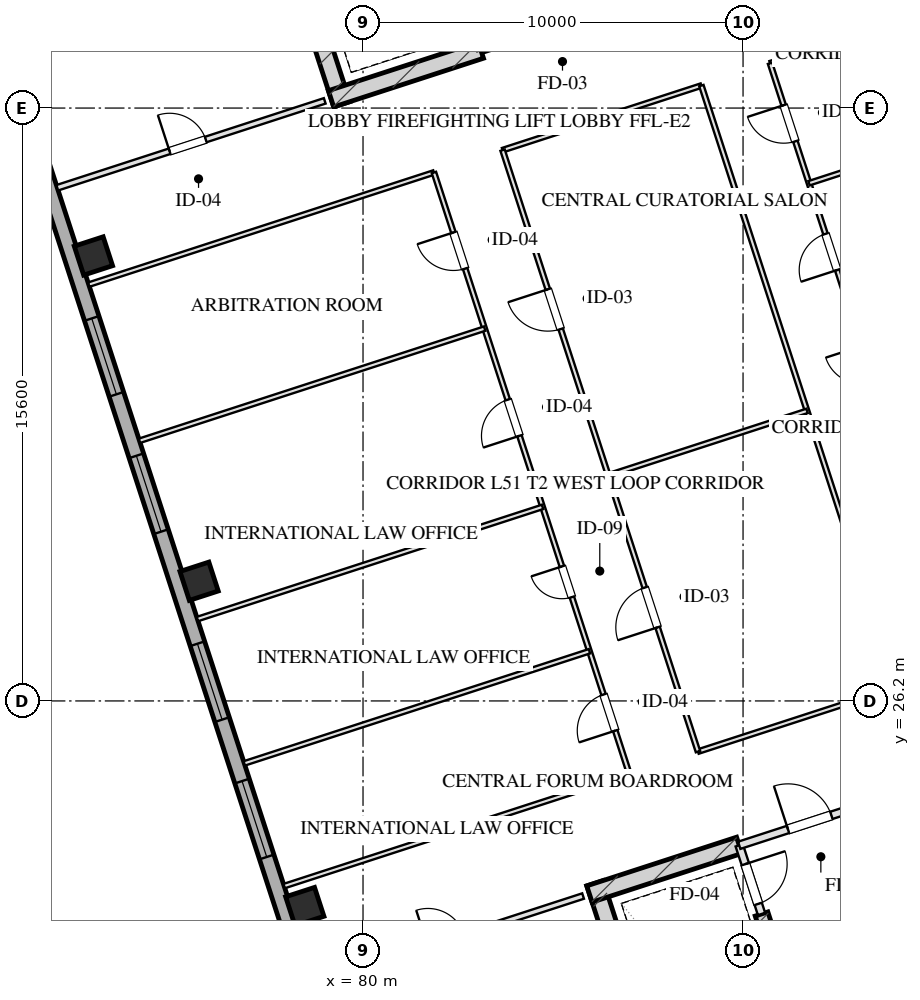
"""IFC4 building model, lengths in metres.
Left out: names, types, materials, properties, quantities, classifications, styles, units other than length and angle.
Written with IfcOpenShell. Run it as: python <this file> out.ifc"""

import sys

from ifc_helpers import new_model, si_unit, direction, frame, frame_2d, origin, origin_2d, place, context, subcontext, project, spatial, rectangle, hollow_rectangle, extrude, element, fill, save


model = new_model("IFC4")
c1 = context("Model", 3, precision=1e-05, world=origin(), true_north=direction((0.0, 1.0)))
c2 = subcontext(c1, "Body", "Model", "MODEL_VIEW")
j1 = project(units=[si_unit("LENGTHUNIT", "METRE"), si_unit("PLANEANGLEUNIT", "RADIAN")], contexts=[c1])
p1 = place(None, origin())
s1 = spatial("IfcSite", under=j1, at=p1, CompositionType="ELEMENT")
p2 = place(p1, origin())
s2 = spatial("IfcBuilding", under=s1, at=p2, CompositionType="ELEMENT")
p3 = place(p2, frame((0.0, 0.0, 192.05)))
s3 = spatial("IfcBuildingStorey", under=s2, at=p3, CompositionType="ELEMENT", Elevation=192.05)
p4 = place(p3, frame((86.102, 21.404, 0.0), z_axis=(0.0, 0.0, 1.0), x_axis=(0.309035778627, -0.951050412717, 0.0)))
e1 = element("IfcWall", 1, at=p4, inside=s3, PredefinedType="SHEAR", context=c2, shape_type="SweptSolid", body=[
    extrude(rectangle(XDim=9.33, YDim=0.45, at=frame_2d((4.665, 0.0))), origin(), (0.0, 0.0, 1.0), 3.45),
])
p5 = place(p3, frame((90.486, 20.594, 0.0), z_axis=(0.0, 0.0, 1.0), x_axis=(0.309020428229, -0.951055400562, 0.0)))
e2 = element("IfcWall", 2, at=p5, inside=s3, PredefinedType="SHEAR", context=c2, shape_type="SweptSolid", body=[
    extrude(rectangle(XDim=6.98, YDim=0.35, at=frame_2d((3.49, 0.0))), origin(), (0.0, 0.0, 1.0), 3.45),
])
p6 = place(p3, frame((85.957, 21.12, 0.0), z_axis=(0.0, 0.0, 1.0), x_axis=(0.951064796122, 0.308991510526, 0.0)))
e3 = element("IfcWall", 3, at=p6, inside=s3, PredefinedType="SHEAR", context=c2, shape_type="SweptSolid", body=[
    extrude(rectangle(XDim=4.145, YDim=0.45, at=frame_2d((2.073, 0.0))), origin(), (0.0, 0.0, 1.0), 3.45),
])
p7 = place(p3, frame((79.442, 41.899, 0.0), z_axis=(0.0, 0.0, 1.0), x_axis=(-0.309035778627, 0.951050412717, 0.0)))
e4 = element("IfcWall", 4, at=p7, inside=s3, PredefinedType="SHEAR", context=c2, shape_type="SweptSolid", body=[
    extrude(rectangle(XDim=9.33, YDim=0.45, at=frame_2d((4.665, 0.0))), origin(), (0.0, 0.0, 1.0), 3.45),
])
p8 = place(p3, frame((79.159, 42.043, 0.0), z_axis=(0.0, 0.0, 1.0), x_axis=(0.951047485828, 0.309044785913, 0.0)))
e5 = element("IfcWall", 5, at=p8, inside=s3, PredefinedType="SHEAR", context=c2, shape_type="SweptSolid", body=[
    extrude(rectangle(XDim=4.145, YDim=0.45, at=frame_2d((2.073, 0.0))), origin(), (0.0, 0.0, 1.0), 3.45),
])
for number, where, z_axis, x_axis in (
    (6, (78.468, 20.79, 0.0), (0.0, 0.0, 1.0), (0.951, 0.309, 0.0)),
    (7, (75.687, 29.349, 0.0), (0.0, 0.0, 1.0), (0.951, 0.309, 0.0)),
    (8, (72.906, 37.909, 0.0), (0.0, 0.0, 1.0), (0.951, 0.309, 0.0)),
):
    element("IfcColumn", number, at=place(p3, frame(where, z_axis=z_axis, x_axis=x_axis)), inside=s3, PredefinedType="COLUMN", context=c2, shape_type="SweptSolid", body=[
        extrude(hollow_rectangle(XDim=0.8, YDim=0.8, WallThickness=0.028, at=origin_2d()), origin(), (0.0, 0.0, 1.0), 3.451),
    ])
p9 = place(p3, frame((81.776, 8.827, 0.0), z_axis=(0.0, 0.0, 1.0), x_axis=(-0.309014228706, 0.951057414911, 0.0)))
e9 = element("IfcWall", 9, at=p9, inside=s3, PredefinedType="SOLIDWALL", context=c2, shape_type="SweptSolid", body=[
    extrude(rectangle(XDim=42.8, YDim=0.4, at=frame_2d((21.4, 0.0))), origin(), (0.0, 0.0, 1.0), 2.61),
])
p10 = place(p9, frame((13.95, 0.0, 0.75)))
e10 = element("IfcOpeningElement", 10, at=p10, cuts=e9, PredefinedType="OPENING", context=c2, shape_type="SweptSolid", body=[
    extrude(rectangle(XDim=2.1, YDim=1.46, at=frame_2d((1.05, 0.73))), frame((0.0, 0.21, 0.0), z_axis=(0.0, -1.0, 0.0), x_axis=(1.0, 0.0, 0.0)), (0.0, 0.0, 1.0), 0.42),
])
p11 = place(p9, frame((17.75, 0.0, 0.75)))
e11 = element("IfcOpeningElement", 11, at=p11, cuts=e9, PredefinedType="OPENING", context=c2, shape_type="SweptSolid", body=[
    extrude(rectangle(XDim=2.1, YDim=1.46, at=frame_2d((1.05, 0.73))), frame((0.0, 0.21, 0.0), z_axis=(0.0, -1.0, 0.0), x_axis=(1.0, 0.0, 0.0)), (0.0, 0.0, 1.0), 0.42),
])
p12 = place(p9, frame((22.95, 0.0, 0.75)))
e12 = element("IfcOpeningElement", 12, at=p12, cuts=e9, PredefinedType="OPENING", context=c2, shape_type="SweptSolid", body=[
    extrude(rectangle(XDim=2.1, YDim=1.46, at=frame_2d((1.05, 0.73))), frame((0.0, 0.21, 0.0), z_axis=(0.0, -1.0, 0.0), x_axis=(1.0, 0.0, 0.0)), (0.0, 0.0, 1.0), 0.42),
])
p13 = place(p9, frame((26.75, 0.0, 0.75)))
e13 = element("IfcOpeningElement", 13, at=p13, cuts=e9, PredefinedType="OPENING", context=c2, shape_type="SweptSolid", body=[
    extrude(rectangle(XDim=2.1, YDim=1.46, at=frame_2d((1.05, 0.73))), frame((0.0, 0.21, 0.0), z_axis=(0.0, -1.0, 0.0), x_axis=(1.0, 0.0, 0.0)), (0.0, 0.0, 1.0), 0.42),
])
p14 = place(p3, frame((89.899, 22.401, 0.0), z_axis=(0.0, 0.0, 1.0), x_axis=(0.308932062672, -0.951084108086, 0.0)))
e14 = element("IfcWall", 14, at=p14, inside=s3, PredefinedType="PARTITIONING", context=c2, shape_type="SweptSolid", body=[
    extrude(rectangle(XDim=1.9, YDim=0.2, at=frame_2d((0.95, 0.0))), origin(), (0.0, 0.0, 1.0), 3.175),
])
p15 = place(p14, frame((0.52, 0.0, 0.0)))
e15 = element("IfcOpeningElement", 15, at=p15, cuts=e14, PredefinedType="OPENING", context=c2, shape_type="SweptSolid", body=[
    extrude(rectangle(XDim=1.1, YDim=2.05, at=frame_2d((0.55, 1.025))), frame((0.0, 0.11, 0.0), z_axis=(0.0, -1.0, 0.0), x_axis=(1.0, 0.0, 0.0)), (0.0, 0.0, 1.0), 0.22),
])
p16 = place(p3, frame((89.899, 22.401, 0.0), z_axis=(0.0, 0.0, 1.0), x_axis=(0.951046716504, 0.309047153403, 0.0)))
e16 = element("IfcWall", 16, at=p16, inside=s3, PredefinedType="PARTITIONING", context=c2, shape_type="SweptSolid", body=[
    extrude(rectangle(XDim=3.83, YDim=0.2, at=frame_2d((1.915, 0.0))), origin(), (0.0, 0.0, 1.0), 3.175),
])
p17 = place(p16, frame((1.35, 0.0, 0.0)))
e17 = element("IfcOpeningElement", 17, at=p17, cuts=e16, PredefinedType="OPENING", context=c2, shape_type="SweptSolid", body=[
    extrude(rectangle(XDim=1.2, YDim=2.05, at=frame_2d((0.6, 1.025))), frame((0.0, 0.11, 0.0), z_axis=(0.0, -1.0, 0.0), x_axis=(1.0, 0.0, 0.0)), (0.0, 0.0, 1.0), 0.22),
])
p18 = place(p3, frame((83.101, 43.324, 0.0), z_axis=(0.0, 0.0, 1.0), x_axis=(0.951052804469, 0.309028417967, 0.0)))
e18 = element("IfcWall", 18, at=p18, inside=s3, PredefinedType="PARTITIONING", context=c2, shape_type="SweptSolid", body=[
    extrude(rectangle(XDim=3.83, YDim=0.2, at=frame_2d((1.915, 0.0))), origin(), (0.0, 0.0, 1.0), 3.175),
])
p19 = place(p18, frame((1.35, 0.0, 0.0)))
e19 = element("IfcOpeningElement", 19, at=p19, cuts=e18, PredefinedType="OPENING", context=c2, shape_type="SweptSolid", body=[
    extrude(rectangle(XDim=1.2, YDim=2.05, at=frame_2d((0.6, 1.025))), frame((0.0, 0.11, 0.0), z_axis=(0.0, -1.0, 0.0), x_axis=(1.0, 0.0, 0.0)), (0.0, 0.0, 1.0), 0.22),
])
p20 = place(p3, frame((78.753, 18.78, 0.0), z_axis=(0.0, 0.0, 1.0), x_axis=(0.951060977215, 0.309003264738, 0.0)))
e20 = element("IfcWall", 20, at=p20, inside=s3, PredefinedType="PARTITIONING", context=c2, shape_type="SweptSolid", body=[
    extrude(rectangle(XDim=7.4, YDim=0.15, at=frame_2d((3.7, 0.0))), origin(), (0.0, 0.0, 1.0), 3.175),
])
p21 = place(p20, frame((3.108, 0.0, 0.0)))
e21 = element("IfcOpeningElement", 21, at=p21, cuts=e20, PredefinedType="OPENING", context=c2, shape_type="SweptSolid", body=[
    extrude(rectangle(XDim=1.0, YDim=2.05, at=frame_2d((0.5, 1.025))), frame((0.0, 0.085, 0.0), z_axis=(0.0, -1.0, 0.0), x_axis=(1.0, 0.0, 0.0)), (0.0, 0.0, 1.0), 0.17),
])
p22 = place(p3, frame((71.955, 39.703, 0.0), z_axis=(0.0, 0.0, 1.0), x_axis=(0.951060977215, 0.309003264738, 0.0)))
e22 = element("IfcWall", 22, at=p22, inside=s3, PredefinedType="PARTITIONING", context=c2, shape_type="SweptSolid", body=[
    extrude(rectangle(XDim=7.4, YDim=0.15, at=frame_2d((3.7, 0.0))), origin(), (0.0, 0.0, 1.0), 3.175),
])
p23 = place(p22, frame((3.108, 0.0, 0.0)))
e23 = element("IfcOpeningElement", 23, at=p23, cuts=e22, PredefinedType="OPENING", context=c2, shape_type="SweptSolid", body=[
    extrude(rectangle(XDim=1.0, YDim=2.05, at=frame_2d((0.5, 1.025))), frame((0.0, 0.085, 0.0), z_axis=(0.0, -1.0, 0.0), x_axis=(1.0, 0.0, 0.0)), (0.0, 0.0, 1.0), 0.17),
])
p24 = place(p3, frame((77.925, 21.328, 0.0), z_axis=(0.0, 0.0, 1.0), x_axis=(0.951053980838, 0.309024797601, 0.0)))
e24 = element("IfcWall", 24, at=p24, inside=s3, PredefinedType="PARTITIONING", context=c2, shape_type="SweptSolid", body=[
    extrude(rectangle(XDim=9.55, YDim=0.12, at=frame_2d((4.775, 0.0))), origin(), (0.0, 0.0, 1.0), 3.175),
])
p25 = place(p3, frame((88.814, 24.867, 0.0), z_axis=(0.0, 0.0, 1.0), x_axis=(0.951061793147, 0.309000753423, 0.0)))
e25 = element("IfcWall", 25, at=p25, inside=s3, PredefinedType="PARTITIONING", context=c2, shape_type="SweptSolid", body=[
    extrude(rectangle(XDim=5.5, YDim=0.12, at=frame_2d((2.75, 0.0))), origin(), (0.0, 0.0, 1.0), 3.175),
])
p26 = place(p3, frame((72.783, 37.154, 0.0), z_axis=(0.0, 0.0, 1.0), x_axis=(0.951053980838, 0.309024797601, 0.0)))
e26 = element("IfcWall", 26, at=p26, inside=s3, PredefinedType="PARTITIONING", context=c2, shape_type="SweptSolid", body=[
    extrude(rectangle(XDim=9.55, YDim=0.12, at=frame_2d((4.775, 0.0))), origin(), (0.0, 0.0, 1.0), 3.175),
])
p27 = place(p3, frame((83.672, 40.692, 0.0), z_axis=(0.0, 0.0, 1.0), x_axis=(0.951048747115, 0.30904090443, 0.0)))
e27 = element("IfcWall", 27, at=p27, inside=s3, PredefinedType="PARTITIONING", context=c2, shape_type="SweptSolid", body=[
    extrude(rectangle(XDim=5.5, YDim=0.12, at=frame_2d((2.75, 0.0))), origin(), (0.0, 0.0, 1.0), 3.175),
])
p28 = place(p3, frame((90.71, 42.979, 0.0), z_axis=(0.0, 0.0, 1.0), x_axis=(0.95105853842, 0.309010770845, 0.0)))
e28 = element("IfcWall", 28, at=p28, inside=s3, PredefinedType="PARTITIONING", context=c2, shape_type="SweptSolid", body=[
    extrude(rectangle(XDim=11.95, YDim=0.12, at=frame_2d((5.975, 0.0))), origin(), (0.0, 0.0, 1.0), 3.175),
])
p29 = place(p3, frame((87.007, 24.28, 0.0), z_axis=(0.0, 0.0, 1.0), x_axis=(-0.309022042254, 0.951054876125, 0.0)))
e29 = element("IfcWall", 29, at=p29, inside=s3, PredefinedType="PARTITIONING", context=c2, shape_type="SweptSolid", body=[
    extrude(rectangle(XDim=16.64, YDim=0.12, at=frame_2d((8.32, 0.0))), origin(), (0.0, 0.0, 1.0), 3.175),
])
p30 = place(p29, frame((1.197, 0.0, 0.0)))
e30 = element("IfcOpeningElement", 30, at=p30, cuts=e29, PredefinedType="OPENING", context=c2, shape_type="SweptSolid", body=[
    extrude(rectangle(XDim=1.0, YDim=2.05, at=frame_2d((0.5, 1.025))), frame((0.0, 0.07, 0.0), z_axis=(0.0, -1.0, 0.0), x_axis=(1.0, 0.0, 0.0)), (0.0, 0.0, 1.0), 0.14),
])
p31 = place(p29, frame((4.891, 0.0, 0.0)))
e31 = element("IfcOpeningElement", 31, at=p31, cuts=e29, PredefinedType="OPENING", context=c2, shape_type="SweptSolid", body=[
    extrude(rectangle(XDim=0.85, YDim=2.05, at=frame_2d((0.425, 1.025))), frame((0.0, 0.07, 0.0), z_axis=(0.0, -1.0, 0.0), x_axis=(1.0, 0.0, 0.0)), (0.0, 0.0, 1.0), 0.14),
])
p32 = place(p29, frame((9.354, 0.0, 0.0)))
e32 = element("IfcOpeningElement", 32, at=p32, cuts=e29, PredefinedType="OPENING", context=c2, shape_type="SweptSolid", body=[
    extrude(rectangle(XDim=1.0, YDim=2.05, at=frame_2d((0.5, 1.025))), frame((0.0, 0.07, 0.0), z_axis=(0.0, -1.0, 0.0), x_axis=(1.0, 0.0, 0.0)), (0.0, 0.0, 1.0), 0.14),
])
p33 = place(p29, frame((13.98, 0.0, 0.0)))
e33 = element("IfcOpeningElement", 33, at=p33, cuts=e29, PredefinedType="OPENING", context=c2, shape_type="SweptSolid", body=[
    extrude(rectangle(XDim=1.0, YDim=2.05, at=frame_2d((0.5, 1.025))), frame((0.0, 0.07, 0.0), z_axis=(0.0, -1.0, 0.0), x_axis=(1.0, 0.0, 0.0)), (0.0, 0.0, 1.0), 0.14),
])
p34 = place(p3, frame((88.814, 24.867, 0.0), z_axis=(0.0, 0.0, 1.0), x_axis=(-0.309022042254, 0.951054876125, 0.0)))
e34 = element("IfcWall", 34, at=p34, inside=s3, PredefinedType="PARTITIONING", context=c2, shape_type="SweptSolid", body=[
    extrude(rectangle(XDim=16.64, YDim=0.12, at=frame_2d((8.32, 0.0))), origin(), (0.0, 0.0, 1.0), 3.175),
])
p35 = place(p34, frame((3.438, 0.0, 0.0)))
e35 = element("IfcOpeningElement", 35, at=p35, cuts=e34, PredefinedType="OPENING", context=c2, shape_type="SweptSolid", body=[
    extrude(rectangle(XDim=1.1, YDim=2.05, at=frame_2d((0.55, 1.025))), frame((0.0, 0.07, 0.0), z_axis=(0.0, -1.0, 0.0), x_axis=(1.0, 0.0, 0.0)), (0.0, 0.0, 1.0), 0.14),
])
p36 = place(p34, frame((11.69, 0.0, 0.0)))
e36 = element("IfcOpeningElement", 36, at=p36, cuts=e34, PredefinedType="OPENING", context=c2, shape_type="SweptSolid", body=[
    extrude(rectangle(XDim=1.1, YDim=2.05, at=frame_2d((0.55, 1.025))), frame((0.0, 0.07, 0.0), z_axis=(0.0, -1.0, 0.0), x_axis=(1.0, 0.0, 0.0)), (0.0, 0.0, 1.0), 0.14),
])
p37 = place(p3, frame((94.045, 26.566, 0.0), z_axis=(0.0, 0.0, 1.0), x_axis=(-0.30901773025, 0.951056277195, 0.0)))
e37 = element("IfcWall", 37, at=p37, inside=s3, PredefinedType="PARTITIONING", context=c2, shape_type="SweptSolid", body=[
    extrude(rectangle(XDim=16.64, YDim=0.12, at=frame_2d((8.32, 0.0))), origin(), (0.0, 0.0, 1.0), 3.175),
])
p38 = place(p3, frame((95.852, 27.153, 0.0), z_axis=(0.0, 0.0, 1.0), x_axis=(-0.309004459387, 0.951060589068, 0.0)))
e38 = element("IfcWall", 38, at=p38, inside=s3, PredefinedType="PARTITIONING", context=c2, shape_type="SweptSolid", body=[
    extrude(rectangle(XDim=16.64, YDim=0.12, at=frame_2d((8.32, 0.0))), origin(), (0.0, 0.0, 1.0), 3.175),
])
p39 = place(p38, frame((1.16, 0.0, 0.0)))
e39 = element("IfcOpeningElement", 39, at=p39, cuts=e38, PredefinedType="OPENING", context=c2, shape_type="SweptSolid", body=[
    extrude(rectangle(XDim=1.0, YDim=2.05, at=frame_2d((0.5, 1.025))), frame((0.0, 0.07, 0.0), z_axis=(0.0, -1.0, 0.0), x_axis=(1.0, 0.0, 0.0)), (0.0, 0.0, 1.0), 0.14),
])
p40 = place(p38, frame((4.72, 0.0, 0.0)))
e40 = element("IfcOpeningElement", 40, at=p40, cuts=e38, PredefinedType="OPENING", context=c2, shape_type="SweptSolid", body=[
    extrude(rectangle(XDim=1.0, YDim=2.05, at=frame_2d((0.5, 1.025))), frame((0.0, 0.07, 0.0), z_axis=(0.0, -1.0, 0.0), x_axis=(1.0, 0.0, 0.0)), (0.0, 0.0, 1.0), 0.14),
])
p41 = place(p38, frame((7.82, 0.0, 0.0)))
e41 = element("IfcOpeningElement", 41, at=p41, cuts=e38, PredefinedType="OPENING", context=c2, shape_type="SweptSolid", body=[
    extrude(rectangle(XDim=1.0, YDim=2.05, at=frame_2d((0.5, 1.025))), frame((0.0, 0.07, 0.0), z_axis=(0.0, -1.0, 0.0), x_axis=(1.0, 0.0, 0.0)), (0.0, 0.0, 1.0), 0.14),
])
p42 = place(p38, frame((10.92, 0.0, 0.0)))
e42 = element("IfcOpeningElement", 42, at=p42, cuts=e38, PredefinedType="OPENING", context=c2, shape_type="SweptSolid", body=[
    extrude(rectangle(XDim=1.0, YDim=2.05, at=frame_2d((0.5, 1.025))), frame((0.0, 0.07, 0.0), z_axis=(0.0, -1.0, 0.0), x_axis=(1.0, 0.0, 0.0)), (0.0, 0.0, 1.0), 0.14),
])
p43 = place(p38, frame((14.48, 0.0, 0.0)))
e43 = element("IfcOpeningElement", 43, at=p43, cuts=e38, PredefinedType="OPENING", context=c2, shape_type="SweptSolid", body=[
    extrude(rectangle(XDim=1.0, YDim=2.05, at=frame_2d((0.5, 1.025))), frame((0.0, 0.07, 0.0), z_axis=(0.0, -1.0, 0.0), x_axis=(1.0, 0.0, 0.0)), (0.0, 0.0, 1.0), 0.14),
])
p44 = place(p3, frame((86.453, 32.133, 0.0), z_axis=(0.0, 0.0, 1.0), x_axis=(0.951052986339, 0.309027858251, 0.0)))
e44 = element("IfcWall", 44, at=p44, inside=s3, PredefinedType="PARTITIONING", context=c2, shape_type="SweptSolid", body=[
    extrude(rectangle(XDim=5.5, YDim=0.12, at=frame_2d((2.75, 0.0))), origin(), (0.0, 0.0, 1.0), 3.175),
])
p45 = place(p3, frame((76.876, 24.557, 0.0), z_axis=(0.0, 0.0, 1.0), x_axis=(0.951056422073, 0.309017284359, 0.0)))
e45 = element("IfcWall", 45, at=p45, inside=s3, PredefinedType="PARTITIONING", context=c2, shape_type="SweptSolid", body=[
    extrude(rectangle(XDim=9.55, YDim=0.12, at=frame_2d((4.775, 0.0))), origin(), (0.0, 0.0, 1.0), 3.175),
])
for number, where, z_axis, x_axis in (
    (46, (75.642, 28.355, 0.0), (0.0, 0.0, 1.0), (0.951, 0.309, 0.0)),
    (47, (74.118, 33.045, 0.0), (0.0, 0.0, 1.0), (0.951, 0.309, 0.0)),
):
    element("IfcWall", number, at=place(p3, frame(where, z_axis=z_axis, x_axis=x_axis)), inside=s3, PredefinedType="PARTITIONING", context=c2, shape_type="SweptSolid", body=[
        extrude(rectangle(XDim=9.55, YDim=0.12, at=frame_2d((4.775, 0.0))), origin(), (0.0, 0.0, 1.0), 3.175),
    ])
p46 = place(p3, frame((91.736, 39.821, 0.0), z_axis=(0.0, 0.0, 1.0), x_axis=(0.951052534024, 0.309029250277, 0.0)))
e48 = element("IfcWall", 48, at=p46, inside=s3, PredefinedType="PARTITIONING", context=c2, shape_type="SweptSolid", body=[
    extrude(rectangle(XDim=11.95, YDim=0.12, at=frame_2d((5.975, 0.0))), origin(), (0.0, 0.0, 1.0), 3.175),
])
p47 = place(p10, origin())
e49 = element("IfcWindow", 49, at=p47, inside=s3, PartitioningType="TRIPLE_PANEL_VERTICAL", PredefinedType="WINDOW", context=c2, shape_type="SweptSolid", body=[
    extrude(rectangle(XDim=2.1, YDim=1.46, at=frame_2d((1.05, 0.73))), frame((0.0, 0.03, 0.0), z_axis=(0.0, -1.0, 0.0), x_axis=(1.0, 0.0, 0.0)), (0.0, 0.0, 1.0), 0.06),
])
fill(e10, e49)
p48 = place(p11, origin())
e50 = element("IfcWindow", 50, at=p48, inside=s3, PartitioningType="TRIPLE_PANEL_VERTICAL", PredefinedType="WINDOW", context=c2, shape_type="SweptSolid", body=[
    extrude(rectangle(XDim=2.1, YDim=1.46, at=frame_2d((1.05, 0.73))), frame((0.0, 0.03, 0.0), z_axis=(0.0, -1.0, 0.0), x_axis=(1.0, 0.0, 0.0)), (0.0, 0.0, 1.0), 0.06),
])
fill(e11, e50)
p49 = place(p12, origin())
e51 = element("IfcWindow", 51, at=p49, inside=s3, PartitioningType="TRIPLE_PANEL_VERTICAL", PredefinedType="WINDOW", context=c2, shape_type="SweptSolid", body=[
    extrude(rectangle(XDim=2.1, YDim=1.46, at=frame_2d((1.05, 0.73))), frame((0.0, 0.03, 0.0), z_axis=(0.0, -1.0, 0.0), x_axis=(1.0, 0.0, 0.0)), (0.0, 0.0, 1.0), 0.06),
])
fill(e12, e51)
p50 = place(p13, origin())
e52 = element("IfcWindow", 52, at=p50, inside=s3, PartitioningType="TRIPLE_PANEL_VERTICAL", PredefinedType="WINDOW", context=c2, shape_type="SweptSolid", body=[
    extrude(rectangle(XDim=2.1, YDim=1.46, at=frame_2d((1.05, 0.73))), frame((0.0, 0.03, 0.0), z_axis=(0.0, -1.0, 0.0), x_axis=(1.0, 0.0, 0.0)), (0.0, 0.0, 1.0), 0.06),
])
fill(e13, e52)
p51 = place(p15, origin())
e53 = element("IfcDoor", 53, at=p51, inside=s3, OperationType="SINGLE_SWING_LEFT", PredefinedType="DOOR", context=c2, shape_type="SweptSolid", body=[
    extrude(rectangle(XDim=1.1, YDim=2.05, at=frame_2d((0.55, 1.025))), frame((0.0, 0.025, 0.0), z_axis=(0.0, -1.0, 0.0), x_axis=(1.0, 0.0, 0.0)), (0.0, 0.0, 1.0), 0.05),
])
fill(e15, e53)
p52 = place(p17, origin())
e54 = element("IfcDoor", 54, at=p52, inside=s3, OperationType="SINGLE_SWING_LEFT", PredefinedType="DOOR", context=c2, shape_type="SweptSolid", body=[
    extrude(rectangle(XDim=1.2, YDim=2.05, at=frame_2d((0.6, 1.025))), frame((0.0, 0.025, 0.0), z_axis=(0.0, -1.0, 0.0), x_axis=(1.0, 0.0, 0.0)), (0.0, 0.0, 1.0), 0.05),
])
fill(e17, e54)
p53 = place(p23, origin())
e55 = element("IfcDoor", 55, at=p53, inside=s3, OperationType="SINGLE_SWING_LEFT", PredefinedType="DOOR", context=c2, shape_type="SweptSolid", body=[
    extrude(rectangle(XDim=1.0, YDim=2.05, at=frame_2d((0.5, 1.025))), frame((0.0, 0.025, 0.0), z_axis=(0.0, -1.0, 0.0), x_axis=(1.0, 0.0, 0.0)), (0.0, 0.0, 1.0), 0.05),
])
fill(e23, e55)
p54 = place(p30, origin())
e56 = element("IfcDoor", 56, at=p54, inside=s3, OperationType="SINGLE_SWING_LEFT", PredefinedType="DOOR", context=c2, shape_type="SweptSolid", body=[
    extrude(rectangle(XDim=1.0, YDim=2.05, at=frame_2d((0.5, 1.025))), frame((0.0, 0.025, 0.0), z_axis=(0.0, -1.0, 0.0), x_axis=(1.0, 0.0, 0.0)), (0.0, 0.0, 1.0), 0.05),
])
fill(e30, e56)
p55 = place(p31, origin())
e57 = element("IfcDoor", 57, at=p55, inside=s3, OperationType="SINGLE_SWING_RIGHT", PredefinedType="DOOR", context=c2, shape_type="SweptSolid", body=[
    extrude(rectangle(XDim=0.85, YDim=2.05, at=frame_2d((0.425, 1.025))), frame((0.0, 0.025, 0.0), z_axis=(0.0, -1.0, 0.0), x_axis=(1.0, 0.0, 0.0)), (0.0, 0.0, 1.0), 0.05),
])
fill(e31, e57)
p56 = place(p32, origin())
e58 = element("IfcDoor", 58, at=p56, inside=s3, OperationType="SINGLE_SWING_LEFT", PredefinedType="DOOR", context=c2, shape_type="SweptSolid", body=[
    extrude(rectangle(XDim=1.0, YDim=2.05, at=frame_2d((0.5, 1.025))), frame((0.0, 0.025, 0.0), z_axis=(0.0, -1.0, 0.0), x_axis=(1.0, 0.0, 0.0)), (0.0, 0.0, 1.0), 0.05),
])
fill(e32, e58)
p57 = place(p33, origin())
e59 = element("IfcDoor", 59, at=p57, inside=s3, OperationType="SINGLE_SWING_RIGHT", PredefinedType="DOOR", context=c2, shape_type="SweptSolid", body=[
    extrude(rectangle(XDim=1.0, YDim=2.05, at=frame_2d((0.5, 1.025))), frame((0.0, 0.025, 0.0), z_axis=(0.0, -1.0, 0.0), x_axis=(1.0, 0.0, 0.0)), (0.0, 0.0, 1.0), 0.05),
])
fill(e33, e59)
p58 = place(p35, origin())
e60 = element("IfcDoor", 60, at=p58, inside=s3, OperationType="SINGLE_SWING_LEFT", PredefinedType="DOOR", context=c2, shape_type="SweptSolid", body=[
    extrude(rectangle(XDim=1.1, YDim=2.05, at=frame_2d((0.55, 1.025))), frame((0.0, 0.025, 0.0), z_axis=(0.0, -1.0, 0.0), x_axis=(1.0, 0.0, 0.0)), (0.0, 0.0, 1.0), 0.05),
])
fill(e35, e60)
p59 = place(p36, origin())
e61 = element("IfcDoor", 61, at=p59, inside=s3, OperationType="SINGLE_SWING_RIGHT", PredefinedType="DOOR", context=c2, shape_type="SweptSolid", body=[
    extrude(rectangle(XDim=1.1, YDim=2.05, at=frame_2d((0.55, 1.025))), frame((0.0, 0.025, 0.0), z_axis=(0.0, -1.0, 0.0), x_axis=(1.0, 0.0, 0.0)), (0.0, 0.0, 1.0), 0.05),
])
fill(e36, e61)
p60 = place(p42, origin())
e62 = element("IfcDoor", 62, at=p60, inside=s3, OperationType="SINGLE_SWING_LEFT", PredefinedType="DOOR", context=c2, shape_type="SweptSolid", body=[
    extrude(rectangle(XDim=1.0, YDim=2.05, at=frame_2d((0.5, 1.025))), frame((0.0, 0.025, 0.0), z_axis=(0.0, -1.0, 0.0), x_axis=(1.0, 0.0, 0.0)), (0.0, 0.0, 1.0), 0.05),
])
fill(e42, e62)
p61 = place(p43, origin())
e63 = element("IfcDoor", 63, at=p61, inside=s3, OperationType="SINGLE_SWING_RIGHT", PredefinedType="DOOR", context=c2, shape_type="SweptSolid", body=[
    extrude(rectangle(XDim=1.0, YDim=2.05, at=frame_2d((0.5, 1.025))), frame((0.0, 0.025, 0.0), z_axis=(0.0, -1.0, 0.0), x_axis=(1.0, 0.0, 0.0)), (0.0, 0.0, 1.0), 0.05),
])
fill(e43, e63)
save(model, sys.argv[1])
